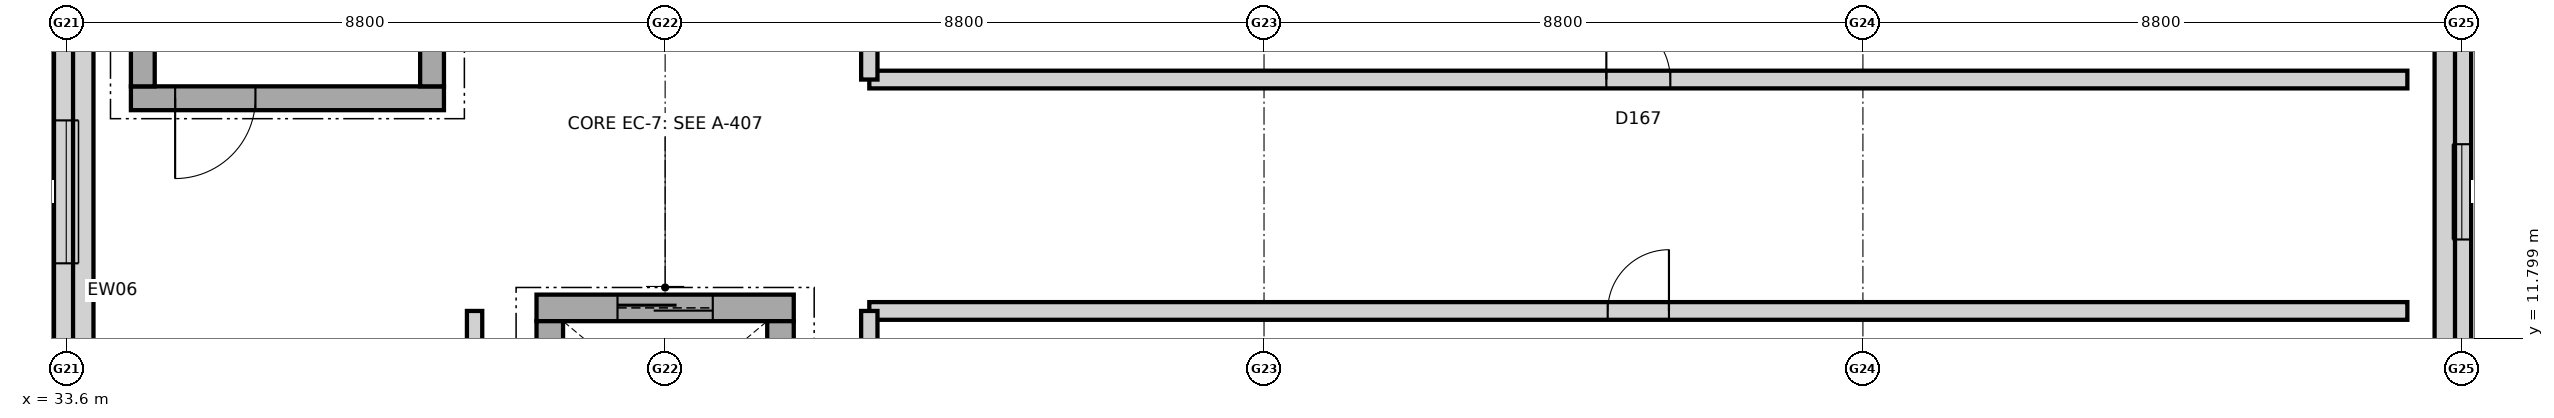
"""IFC4 building model, lengths in metres.
Left out: names, types, materials, properties, quantities, classifications, styles, units other than length and angle.
Written with IfcOpenShell. Run it as: python <this file> out.ifc"""

import sys

from ifc_helpers import new_model, si_unit, direction, frame, frame_2d, origin, origin_2d, place, context, subcontext, project, spatial, rectangle, extrude, element, fill, save


model = new_model("IFC4")
c1 = context("Model", 3, precision=1e-05, world=origin(), true_north=direction((0.0, 1.0)))
c2 = subcontext(c1, "Body", "Model", "MODEL_VIEW")
j1 = project(units=[si_unit("LENGTHUNIT", "METRE"), si_unit("PLANEANGLEUNIT", "RADIAN")], contexts=[c1])
p1 = place(None, origin())
s1 = spatial("IfcSite", under=j1, at=p1, CompositionType="ELEMENT")
p2 = place(p1, origin())
s2 = spatial("IfcBuilding", under=s1, at=p2, CompositionType="ELEMENT")
p3 = place(p2, frame((0.0, 0.0, 24.6)))
s3 = spatial("IfcBuildingStorey", under=s2, at=p3, CompositionType="ELEMENT", Elevation=24.6)
p4 = place(p3, frame((33.6, 10.648, 0.0), z_axis=(0.0, 0.0, 1.0), x_axis=(0.0, 1.0, 0.0)))
e1 = element("IfcWall", 1, at=p4, inside=s3, PredefinedType="STANDARD", context=c2, shape_type="SweptSolid", body=[
    extrude(rectangle(XDim=6.604, YDim=0.36, at=frame_2d((3.302, 0.0))), origin(), (0.0, 0.0, 1.0), 4.429),
])
p5 = place(p4, frame((2.252, 0.0, 0.6)))
e2 = element("IfcOpeningElement", 2, at=p5, cuts=e1, PredefinedType="OPENING", context=c2, shape_type="SweptSolid", body=[
    extrude(rectangle(XDim=2.1, YDim=2.35, at=frame_2d((1.05, 1.175))), frame((0.0, 0.19, 0.0), z_axis=(0.0, -1.0, 0.0), x_axis=(1.0, 0.0, 0.0)), (0.0, 0.0, 1.0), 0.38),
])
p6 = place(p3, frame((68.8, 17.252, 0.0), z_axis=(0.0, 0.0, 1.0), x_axis=(0.0, -1.0, 0.0)))
e3 = element("IfcWall", 3, at=p6, inside=s3, PredefinedType="STANDARD", context=c2, shape_type="SweptSolid", body=[
    extrude(rectangle(XDim=6.604, YDim=0.275, at=frame_2d((3.302, 0.0))), origin(), (0.0, 0.0, 1.0), 4.429),
])
p7 = place(p6, frame((2.602, 0.0, 0.85)))
e4 = element("IfcOpeningElement", 4, at=p7, cuts=e3, PredefinedType="OPENING", context=c2, shape_type="SweptSolid", body=[
    extrude(rectangle(XDim=1.4, YDim=1.6, at=frame_2d((0.7, 0.8))), frame((0.0, 0.147, 0.0), z_axis=(0.0, -1.0, 0.0), x_axis=(1.0, 0.0, 0.0)), (0.0, 0.0, 1.0), 0.295),
])
for number, where, z_axis, x_axis in (
    (5, (68.55, 1.65, 5.4), (0.0, 0.0, 1.0), (0.0, 1.0, 0.0)),
    (6, (33.85, 24.75, 5.4), (0.0, 0.0, 1.0), (0.0, -1.0, 0.0)),
):
    element("IfcWall", number, at=place(p3, frame(where, z_axis=z_axis, x_axis=x_axis)), inside=s3, PredefinedType="PARAPET", context=c2, shape_type="SweptSolid", body=[
        extrude(rectangle(XDim=23.1, YDim=0.3, at=frame_2d((11.55, 0.0))), origin(), (0.0, 0.0, 1.0), 1.15),
    ])
p8 = place(p3, frame((39.15, 15.325, 0.0), z_axis=(0.0, 0.0, 1.0), x_axis=(-1.0, 0.0, 0.0)))
e7 = element("IfcWall", 7, at=p8, inside=s3, PredefinedType="SHEAR", context=c2, shape_type="SweptSolid", body=[
    extrude(rectangle(XDim=4.6, YDim=0.35, at=frame_2d((2.3, 0.0))), origin(), (0.0, 0.0, 1.0), 4.645),
])
p9 = place(p8, frame((2.77, 0.0, 0.0)))
e8 = element("IfcOpeningElement", 8, at=p9, cuts=e7, PredefinedType="OPENING", context=c2, shape_type="SweptSolid", body=[
    extrude(rectangle(XDim=1.18, YDim=2.15, at=frame_2d((0.59, 1.075))), frame((0.0, 0.185, 0.0), z_axis=(0.0, -1.0, 0.0), x_axis=(1.0, 0.0, 0.0)), (0.0, 0.0, 1.0), 0.37),
])
for number, where, z_axis, x_axis in (
    (9, (34.725, 15.5, 0.0), (0.0, 0.0, 1.0), (0.0, 1.0, 0.0)),
    (10, (38.975, 23.8, 0.0), (0.0, 0.0, 1.0), (0.0, -1.0, 0.0)),
):
    element("IfcWall", number, at=place(p3, frame(where, z_axis=z_axis, x_axis=x_axis)), inside=s3, PredefinedType="SHEAR", context=c2, shape_type="SweptSolid", body=[
        extrude(rectangle(XDim=8.3, YDim=0.35, at=frame_2d((4.15, 0.0))), origin(), (0.0, 0.0, 1.0), 4.645),
    ])
p10 = place(p3, frame((40.51, 12.245, 0.0), z_axis=(0.0, 0.0, 1.0), x_axis=(1.0, 0.0, 0.0)))
e11 = element("IfcWall", 11, at=p10, inside=s3, PredefinedType="SHEAR", context=c2, shape_type="SweptSolid", body=[
    extrude(rectangle(XDim=3.78, YDim=0.39, at=frame_2d((1.89, 0.0))), origin(), (0.0, 0.0, 1.0), 4.645),
])
p11 = place(p10, frame((1.19, 0.0, 0.0)))
e12 = element("IfcOpeningElement", 12, at=p11, cuts=e11, PredefinedType="OPENING", context=c2, shape_type="SweptSolid", body=[
    extrude(rectangle(XDim=1.4, YDim=2.2, at=frame_2d((0.7, 1.1))), frame((0.0, 0.205, 0.0), z_axis=(0.0, -1.0, 0.0), x_axis=(1.0, 0.0, 0.0)), (0.0, 0.0, 1.0), 0.41),
])
for number, where, z_axis, x_axis in (
    (13, (40.705, 9.55, 0.0), (0.0, 0.0, 1.0), (0.0, 1.0, 0.0)),
    (14, (44.095, 12.05, 0.0), (0.0, 0.0, 1.0), (0.0, -1.0, 0.0)),
):
    element("IfcWall", number, at=place(p3, frame(where, z_axis=z_axis, x_axis=x_axis)), inside=s3, PredefinedType="SHEAR", context=c2, shape_type="SweptSolid", body=[
        extrude(rectangle(XDim=2.5, YDim=0.39, at=frame_2d((1.25, 0.0))), origin(), (0.0, 0.0, 1.0), 4.645),
    ])
p12 = place(p3, frame((45.4, 12.2, 0.0), z_axis=(0.0, 0.0, 1.0), x_axis=(1.0, 0.0, 0.0)))
e15 = element("IfcWall", 15, at=p12, inside=s3, PredefinedType="PARTITIONING", context=c2, shape_type="SweptSolid", body=[
    extrude(rectangle(XDim=22.6, YDim=0.26, at=frame_2d((11.3, 0.0))), origin(), (0.0, 0.0, 1.0), 5.02),
])
p13 = place(p12, frame((10.85, 0.0, 0.0)))
e16 = element("IfcOpeningElement", 16, at=p13, cuts=e15, PredefinedType="OPENING", context=c2, shape_type="SweptSolid", body=[
    extrude(rectangle(XDim=0.9, YDim=2.1, at=frame_2d((0.45, 1.05))), frame((0.0, 0.14, 0.0), z_axis=(0.0, -1.0, 0.0), x_axis=(1.0, 0.0, 0.0)), (0.0, 0.0, 1.0), 0.28),
])
p14 = place(p3, frame((45.4, 2.0, 0.0), z_axis=(0.0, 0.0, 1.0), x_axis=(0.0, 1.0, 0.0)))
e17 = element("IfcWall", 17, at=p14, inside=s3, PredefinedType="PARTITIONING", context=c2, shape_type="SweptSolid", body=[
    extrude(rectangle(XDim=10.2, YDim=0.24, at=frame_2d((5.1, 0.0))), origin(), (0.0, 0.0, 1.0), 5.02),
])
p15 = place(p3, frame((45.4, 15.6, 0.0), z_axis=(0.0, 0.0, 1.0), x_axis=(1.0, 0.0, 0.0)))
e18 = element("IfcWall", 18, at=p15, inside=s3, PredefinedType="PARTITIONING", context=c2, shape_type="SweptSolid", body=[
    extrude(rectangle(XDim=22.6, YDim=0.26, at=frame_2d((11.3, 0.0))), origin(), (0.0, 0.0, 1.0), 5.02),
])
p16 = place(p15, frame((10.83, 0.0, 0.0)))
e19 = element("IfcOpeningElement", 19, at=p16, cuts=e18, PredefinedType="OPENING", context=c2, shape_type="SweptSolid", body=[
    extrude(rectangle(XDim=0.94, YDim=2.1, at=frame_2d((0.47, 1.05))), frame((0.0, 0.14, 0.0), z_axis=(0.0, -1.0, 0.0), x_axis=(1.0, 0.0, 0.0)), (0.0, 0.0, 1.0), 0.28),
])
p17 = place(p3, frame((45.4, 15.6, 0.0), z_axis=(0.0, 0.0, 1.0), x_axis=(0.0, 1.0, 0.0)))
e20 = element("IfcWall", 20, at=p17, inside=s3, PredefinedType="PARTITIONING", context=c2, shape_type="SweptSolid", body=[
    extrude(rectangle(XDim=8.8, YDim=0.24, at=frame_2d((4.4, 0.0))), origin(), (0.0, 0.0, 1.0), 5.02),
])
p18 = place(p3, frame((39.6, 2.0, 0.0), z_axis=(0.0, 0.0, 1.0), x_axis=(0.0, 1.0, 0.0)))
e21 = element("IfcWall", 21, at=p18, inside=s3, PredefinedType="PARTITIONING", context=c2, shape_type="SweptSolid", body=[
    extrude(rectangle(XDim=10.2, YDim=0.225, at=frame_2d((5.1, 0.0))), origin(), (0.0, 0.0, 1.0), 5.02),
])
p19 = place(p18, frame((8.425, 0.0, 0.0)))
e22 = element("IfcOpeningElement", 22, at=p19, cuts=e21, PredefinedType="OPENING", context=c2, shape_type="SweptSolid", body=[
    extrude(rectangle(XDim=0.98, YDim=2.15, at=frame_2d((0.49, 1.075))), frame((0.0, 0.123, 0.0), z_axis=(0.0, -1.0, 0.0), x_axis=(1.0, 0.0, 0.0)), (0.0, 0.0, 1.0), 0.245),
])
p20 = place(p5, origin())
e23 = element("IfcWindow", 23, at=p20, inside=s3, PartitioningType="SINGLE_PANEL", PredefinedType="WINDOW", context=c2, shape_type="SweptSolid", body=[
    extrude(rectangle(XDim=2.1, YDim=2.35, at=frame_2d((1.05, 1.175))), frame((0.0, 0.03, 0.0), z_axis=(0.0, -1.0, 0.0), x_axis=(1.0, 0.0, 0.0)), (0.0, 0.0, 1.0), 0.06),
])
fill(e2, e23)
p21 = place(p7, origin())
e24 = element("IfcWindow", 24, at=p21, inside=s3, PartitioningType="SINGLE_PANEL", PredefinedType="WINDOW", context=c2, shape_type="SweptSolid", body=[
    extrude(rectangle(XDim=1.4, YDim=1.6, at=frame_2d((0.7, 0.8))), frame((0.0, 0.03, 0.0), z_axis=(0.0, -1.0, 0.0), x_axis=(1.0, 0.0, 0.0)), (0.0, 0.0, 1.0), 0.06),
])
fill(e4, e24)
p22 = place(p2, frame((0.0, 0.0, 41.4)))
p23 = place(p22, frame((0.0, 0.0, -11.675)))
p24 = place(p23, frame((42.4, 13.2, 0.0)))
p25 = place(p24, frame((0.0, 0.0, 0.225)))
e25 = element("IfcWindow", 25, at=p25, inside=s3, PartitioningType="SINGLE_PANEL", PredefinedType="SKYLIGHT", context=c2, shape_type="SweptSolid", body=[
    extrude(rectangle(XDim=1.8, YDim=1.8, at=origin_2d()), origin(), (0.0, 0.0, 1.0), 0.05),
])
p26 = place(p23, frame((51.2, 13.2, 0.0)))
p27 = place(p26, frame((0.0, 0.0, 0.225)))
e26 = element("IfcWindow", 26, at=p27, inside=s3, PartitioningType="SINGLE_PANEL", PredefinedType="SKYLIGHT", context=c2, shape_type="SweptSolid", body=[
    extrude(rectangle(XDim=2.2, YDim=1.8, at=origin_2d()), origin(), (0.0, 0.0, 1.0), 0.05),
])
p28 = place(p23, frame((60.0, 13.2, 0.0)))
p29 = place(p28, frame((0.0, 0.0, 0.225)))
e27 = element("IfcWindow", 27, at=p29, inside=s3, PartitioningType="SINGLE_PANEL", PredefinedType="SKYLIGHT", context=c2, shape_type="SweptSolid", body=[
    extrude(rectangle(XDim=2.4, YDim=2.4, at=origin_2d()), origin(), (0.0, 0.0, 1.0), 0.05),
])
p30 = place(p9, origin())
e28 = element("IfcDoor", 28, at=p30, inside=s3, OperationType="SINGLE_SWING_RIGHT", PredefinedType="DOOR", context=c2, shape_type="SweptSolid", body=[
    extrude(rectangle(XDim=1.18, YDim=2.15, at=frame_2d((0.59, 1.075))), frame((0.0, 0.025, 0.0), z_axis=(0.0, -1.0, 0.0), x_axis=(1.0, 0.0, 0.0)), (0.0, 0.0, 1.0), 0.05),
])
fill(e8, e28)
p31 = place(p11, origin())
e29 = element("IfcDoor", 29, at=p31, inside=s3, OperationType="SLIDING_TO_LEFT", PredefinedType="DOOR", context=c2, shape_type="SweptSolid", body=[
    extrude(rectangle(XDim=1.4, YDim=2.2, at=frame_2d((0.7, 1.1))), frame((0.0, 0.025, 0.0), z_axis=(0.0, -1.0, 0.0), x_axis=(1.0, 0.0, 0.0)), (0.0, 0.0, 1.0), 0.05),
])
fill(e12, e29)
p32 = place(p13, origin())
e30 = element("IfcDoor", 30, at=p32, inside=s3, OperationType="SINGLE_SWING_RIGHT", PredefinedType="DOOR", context=c2, shape_type="SweptSolid", body=[
    extrude(rectangle(XDim=0.9, YDim=2.1, at=frame_2d((0.45, 1.05))), frame((0.0, 0.025, 0.0), z_axis=(0.0, -1.0, 0.0), x_axis=(1.0, 0.0, 0.0)), (0.0, 0.0, 1.0), 0.05),
])
fill(e16, e30)
p33 = place(p16, origin())
e31 = element("IfcDoor", 31, at=p33, inside=s3, OperationType="SINGLE_SWING_LEFT", PredefinedType="DOOR", context=c2, shape_type="SweptSolid", body=[
    extrude(rectangle(XDim=0.94, YDim=2.1, at=frame_2d((0.47, 1.05))), frame((0.0, 0.025, 0.0), z_axis=(0.0, -1.0, 0.0), x_axis=(1.0, 0.0, 0.0)), (0.0, 0.0, 1.0), 0.05),
])
fill(e19, e31)
save(model, sys.argv[1])
